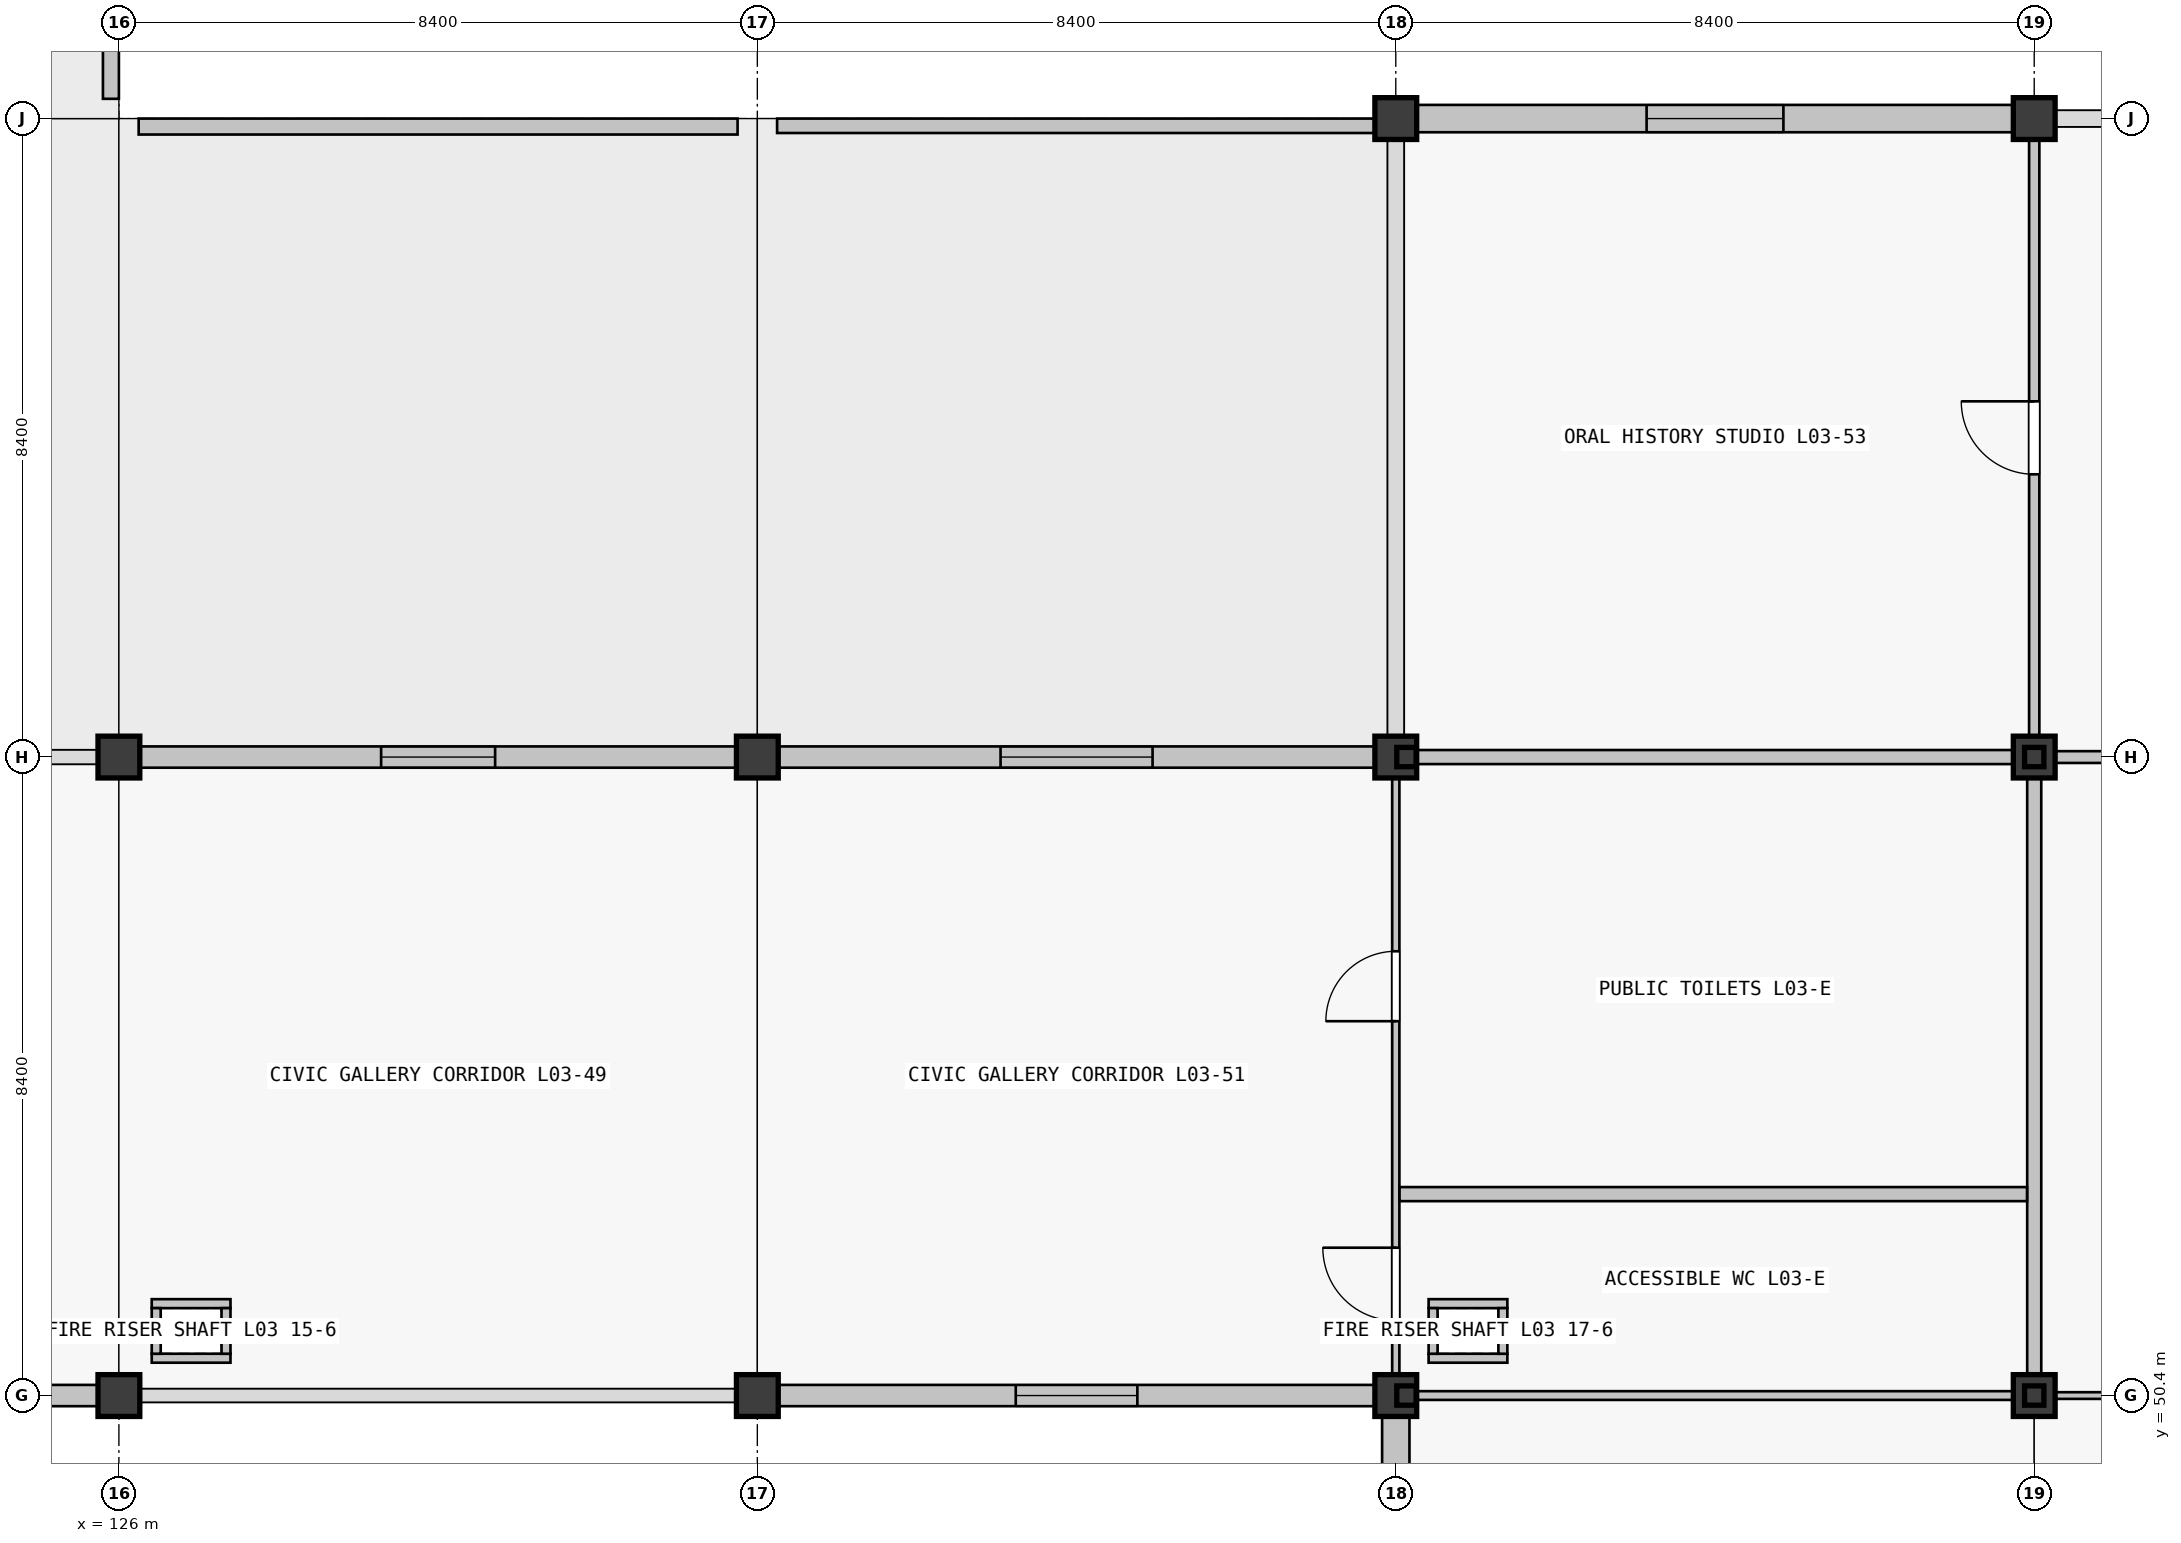
"""IFC4 building model, lengths in metres.
Left out: names, types, materials, properties, quantities, classifications, styles, units other than length and angle.
Written with IfcOpenShell. Run it as: python <this file> out.ifc"""

import sys

from ifc_helpers import new_model, si_unit, direction, frame, frame_2d, origin, origin_2d, place, context, subcontext, project, spatial, rectangle, i_section, extrude, element, fill, save


model = new_model("IFC4")
c1 = context("Model", 3, precision=1e-05, world=origin(), true_north=direction((0.0, 1.0)))
c2 = subcontext(c1, "Body", "Model", "MODEL_VIEW")
j1 = project(units=[si_unit("LENGTHUNIT", "METRE"), si_unit("PLANEANGLEUNIT", "RADIAN")], contexts=[c1])
p1 = place(None, origin())
s1 = spatial("IfcSite", under=j1, at=p1, CompositionType="ELEMENT")
p2 = place(p1, origin())
s2 = spatial("IfcBuilding", under=s1, at=p2, CompositionType="ELEMENT")
p3 = place(p2, frame((0.0, 0.0, 14.76)))
s3 = spatial("IfcBuildingStorey", under=s2, at=p3, CompositionType="ELEMENT", Elevation=14.76)
for number, where, z_axis, x_axis in (
    (1, (126.0, 50.4, 0.0), (0.0, 0.0, 1.0), (1.0, 0.0, 0.0)),
    (2, (126.0, 58.8, 0.0), (0.0, 0.0, 1.0), (1.0, 0.0, 0.0)),
    (3, (134.4, 50.4, 0.0), (0.0, 0.0, 1.0), (1.0, 0.0, 0.0)),
    (4, (134.4, 58.8, 0.0), (0.0, 0.0, 1.0), (1.0, 0.0, 0.0)),
):
    element("IfcColumn", number, at=place(p3, frame(where, z_axis=z_axis, x_axis=x_axis)), inside=s3, PredefinedType="COLUMN", context=c2, shape_type="SweptSolid", body=[
        extrude(rectangle(XDim=0.55, YDim=0.55, at=origin_2d()), origin(), (0.0, 0.0, 1.0), 4.07),
    ])
for number, where, z_axis, x_axis in (
    (5, (142.8, 50.4, 0.0), (0.0, 0.0, 1.0), (1.0, 0.0, 0.0)),
    (6, (142.8, 58.8, 0.0), (0.0, 0.0, 1.0), (1.0, 0.0, 0.0)),
    (7, (142.8, 67.2, 0.0), (0.0, 0.0, 1.0), (1.0, 0.0, 0.0)),
    (8, (151.2, 50.4, 0.0), (0.0, 0.0, 1.0), (1.0, 0.0, 0.0)),
    (9, (151.2, 58.8, 0.0), (0.0, 0.0, 1.0), (1.0, 0.0, 0.0)),
    (10, (151.2, 67.2, 0.0), (0.0, 0.0, 1.0), (1.0, 0.0, 0.0)),
):
    element("IfcColumn", number, at=place(p3, frame(where, z_axis=z_axis, x_axis=x_axis)), inside=s3, PredefinedType="COLUMN", context=c2, shape_type="SweptSolid", body=[
        extrude(rectangle(XDim=0.55, YDim=0.55, at=origin_2d()), origin(), (0.0, 0.0, 1.0), 4.17),
    ])
for number, where, z_axis, x_axis in (
    (11, (142.94, 50.4, 4.17), (0.0, 0.0, 1.0), (1.0, 0.0, 0.0)),
    (12, (151.2, 50.4, 4.17), (0.0, 0.0, 1.0), (1.0, 0.0, 0.0)),
    (13, (142.94, 58.8, 4.17), (0.0, 0.0, 1.0), (1.0, 0.0, 0.0)),
    (14, (151.2, 58.8, 4.17), (0.0, 0.0, 1.0), (1.0, 0.0, 0.0)),
):
    element("IfcColumn", number, at=place(p3, frame(where, z_axis=z_axis, x_axis=x_axis)), inside=s3, PredefinedType="COLUMN", context=c2, shape_type="SweptSolid", body=[
        extrude(i_section(OverallWidth=0.254, OverallDepth=0.254, WebThickness=0.009, FlangeThickness=0.014, FilletRadius=0.013, at=origin_2d()), origin(), (0.0, 0.0, 1.0), 2.157),
    ])
p4 = place(p3, frame((125.724, 50.4, 0.0), z_axis=(0.0, 0.0, 1.0), x_axis=(-1.0, 0.0, 0.0)))
e15 = element("IfcWall", 15, at=p4, inside=s3, PredefinedType="SOLIDWALL", context=c2, shape_type="SweptSolid", body=[
    extrude(rectangle(XDim=7.848, YDim=0.28, at=frame_2d((3.924, 0.0))), origin(), (0.0, 0.0, 1.0), 3.37),
])
p5 = place(p4, frame((3.024, 0.0, 0.9)))
e16 = element("IfcOpeningElement", 16, at=p5, cuts=e15, PredefinedType="OPENING", context=c2, shape_type="SweptSolid", body=[
    extrude(rectangle(XDim=1.8, YDim=1.8, at=frame_2d((0.9, 0.9))), frame((0.0, 0.14, 0.0), z_axis=(0.0, -1.0, 0.0), x_axis=(1.0, 0.0, 0.0)), (0.0, 0.0, 1.0), 0.28),
])
p6 = place(p3, frame((126.276, 58.8, 0.0), z_axis=(0.0, 0.0, 1.0), x_axis=(1.0, 0.0, 0.0)))
e17 = element("IfcWall", 17, at=p6, inside=s3, PredefinedType="SOLIDWALL", context=c2, shape_type="SweptSolid", body=[
    extrude(rectangle(XDim=7.848, YDim=0.28, at=frame_2d((3.924, 0.0))), origin(), (0.0, 0.0, 1.0), 3.37),
])
p7 = place(p6, frame((3.174, 0.0, 0.9)))
e18 = element("IfcOpeningElement", 18, at=p7, cuts=e17, PredefinedType="OPENING", context=c2, shape_type="SweptSolid", body=[
    extrude(rectangle(XDim=1.5, YDim=1.8, at=frame_2d((0.75, 0.9))), frame((0.0, 0.14, 0.0), z_axis=(0.0, -1.0, 0.0), x_axis=(1.0, 0.0, 0.0)), (0.0, 0.0, 1.0), 0.28),
])
p8 = place(p3, frame((142.524, 50.4, 0.0), z_axis=(0.0, 0.0, 1.0), x_axis=(-1.0, 0.0, 0.0)))
e19 = element("IfcWall", 19, at=p8, inside=s3, PredefinedType="SOLIDWALL", context=c2, shape_type="SweptSolid", body=[
    extrude(rectangle(XDim=7.848, YDim=0.28, at=frame_2d((3.924, 0.0))), origin(), (0.0, 0.0, 1.0), 3.37),
])
p9 = place(p8, frame((3.124, 0.0, 0.9)))
e20 = element("IfcOpeningElement", 20, at=p9, cuts=e19, PredefinedType="OPENING", context=c2, shape_type="SweptSolid", body=[
    extrude(rectangle(XDim=1.6, YDim=2.1, at=frame_2d((0.8, 1.05))), frame((0.0, 0.14, 0.0), z_axis=(0.0, -1.0, 0.0), x_axis=(1.0, 0.0, 0.0)), (0.0, 0.0, 1.0), 0.28),
])
p10 = place(p3, frame((134.676, 58.8, 0.0), z_axis=(0.0, 0.0, 1.0), x_axis=(1.0, 0.0, 0.0)))
e21 = element("IfcWall", 21, at=p10, inside=s3, PredefinedType="SOLIDWALL", context=c2, shape_type="SweptSolid", body=[
    extrude(rectangle(XDim=7.848, YDim=0.28, at=frame_2d((3.924, 0.0))), origin(), (0.0, 0.0, 1.0), 3.37),
])
p11 = place(p10, frame((2.924, 0.0, 0.9)))
e22 = element("IfcOpeningElement", 22, at=p11, cuts=e21, PredefinedType="OPENING", context=c2, shape_type="SweptSolid", body=[
    extrude(rectangle(XDim=2.0, YDim=2.1, at=frame_2d((1.0, 1.05))), frame((0.0, 0.14, 0.0), z_axis=(0.0, -1.0, 0.0), x_axis=(1.0, 0.0, 0.0)), (0.0, 0.0, 1.0), 0.28),
])
p12 = place(p3, frame((142.8, 42.276, 0.0), z_axis=(0.0, 0.0, 1.0), x_axis=(0.0, 1.0, 0.0)))
e23 = element("IfcWall", 23, at=p12, inside=s3, PredefinedType="SOLIDWALL", context=c2, shape_type="SweptSolid", body=[
    extrude(rectangle(XDim=7.848, YDim=0.36, at=frame_2d((3.924, 0.0))), origin(), (0.0, 0.0, 1.0), 3.37),
])
p13 = place(p12, frame((2.824, 0.0, 0.9)))
e24 = element("IfcOpeningElement", 24, at=p13, cuts=e23, PredefinedType="OPENING", context=c2, shape_type="SweptSolid", body=[
    extrude(rectangle(XDim=2.2, YDim=1.35, at=frame_2d((1.1, 0.675))), frame((0.0, 0.18, 0.0), z_axis=(0.0, -1.0, 0.0), x_axis=(1.0, 0.0, 0.0)), (0.0, 0.0, 1.0), 0.36),
])
p14 = place(p3, frame((143.076, 67.2, 0.0), z_axis=(0.0, 0.0, 1.0), x_axis=(1.0, 0.0, 0.0)))
e25 = element("IfcWall", 25, at=p14, inside=s3, PredefinedType="SOLIDWALL", context=c2, shape_type="SweptSolid", body=[
    extrude(rectangle(XDim=7.848, YDim=0.36, at=frame_2d((3.924, 0.0))), origin(), (0.0, 0.0, 1.0), 3.37),
])
p15 = place(p14, frame((3.024, 0.0, 0.9)))
e26 = element("IfcOpeningElement", 26, at=p15, cuts=e25, PredefinedType="OPENING", context=c2, shape_type="SweptSolid", body=[
    extrude(rectangle(XDim=1.8, YDim=1.35, at=frame_2d((0.9, 0.675))), frame((0.0, 0.18, 0.0), z_axis=(0.0, -1.0, 0.0), x_axis=(1.0, 0.0, 0.0)), (0.0, 0.0, 1.0), 0.36),
])
p16 = place(p3, frame((125.895, 75.34, 0.0), z_axis=(0.0, 0.0, 1.0), x_axis=(0.0, -1.0, 0.0)))
e27 = element("IfcWall", 27, at=p16, inside=s3, PredefinedType="PARAPET", context=c2, shape_type="SweptSolid", body=[
    extrude(rectangle(XDim=7.88, YDim=0.21, at=frame_2d((3.94, 0.0))), origin(), (0.0, 0.0, 1.0), 0.95),
])
p17 = place(p3, frame((126.26, 67.095, 0.0), z_axis=(0.0, 0.0, 1.0), x_axis=(1.0, 0.0, 0.0)))
e28 = element("IfcWall", 28, at=p17, inside=s3, PredefinedType="PARAPET", context=c2, shape_type="SweptSolid", body=[
    extrude(rectangle(XDim=7.88, YDim=0.21, at=frame_2d((3.94, 0.0))), origin(), (0.0, 0.0, 1.0), 0.95),
])
p18 = place(p3, frame((134.66, 67.105, 0.0), z_axis=(0.0, 0.0, 1.0), x_axis=(1.0, 0.0, 0.0)))
e29 = element("IfcWall", 29, at=p18, inside=s3, PredefinedType="PARAPET", context=c2, shape_type="SweptSolid", body=[
    extrude(rectangle(XDim=7.88, YDim=0.19, at=frame_2d((3.94, 0.0))), origin(), (0.0, 0.0, 1.0), 0.95),
])
for number, where, z_axis, x_axis in (
    (30, (126.432, 50.891, 0.0), (0.0, 0.0, 1.0), (1.0, 0.0, 0.0)),
    (31, (126.432, 51.609, 0.0), (0.0, 0.0, 1.0), (1.0, 0.0, 0.0)),
):
    element("IfcWall", number, at=place(p3, frame(where, z_axis=z_axis, x_axis=x_axis)), inside=s3, PredefinedType="PARTITIONING", context=c2, shape_type="SweptSolid", body=[
        extrude(rectangle(XDim=1.036, YDim=0.118, at=frame_2d((0.518, 0.0))), origin(), (0.0, 0.0, 1.0), 3.35),
    ])
for number, where, z_axis, x_axis in (
    (32, (126.491, 50.95, 0.0), (0.0, 0.0, 1.0), (0.0, 1.0, 0.0)),
    (33, (127.409, 50.95, 0.0), (0.0, 0.0, 1.0), (0.0, 1.0, 0.0)),
):
    element("IfcWall", number, at=place(p3, frame(where, z_axis=z_axis, x_axis=x_axis)), inside=s3, PredefinedType="PARTITIONING", context=c2, shape_type="SweptSolid", body=[
        extrude(rectangle(XDim=0.6, YDim=0.118, at=frame_2d((0.3, 0.0))), origin(), (0.0, 0.0, 1.0), 3.35),
    ])
for number, where, z_axis, x_axis in (
    (34, (143.232, 50.891, 0.0), (0.0, 0.0, 1.0), (1.0, 0.0, 0.0)),
    (35, (143.232, 51.609, 0.0), (0.0, 0.0, 1.0), (1.0, 0.0, 0.0)),
):
    element("IfcWall", number, at=place(p3, frame(where, z_axis=z_axis, x_axis=x_axis)), inside=s3, PredefinedType="PARTITIONING", context=c2, shape_type="SweptSolid", body=[
        extrude(rectangle(XDim=1.036, YDim=0.118, at=frame_2d((0.518, 0.0))), origin(), (0.0, 0.0, 1.0), 3.35),
    ])
for number, where, z_axis, x_axis in (
    (36, (143.291, 50.95, 0.0), (0.0, 0.0, 1.0), (0.0, 1.0, 0.0)),
    (37, (144.209, 50.95, 0.0), (0.0, 0.0, 1.0), (0.0, 1.0, 0.0)),
):
    element("IfcWall", number, at=place(p3, frame(where, z_axis=z_axis, x_axis=x_axis)), inside=s3, PredefinedType="PARTITIONING", context=c2, shape_type="SweptSolid", body=[
        extrude(rectangle(XDim=0.6, YDim=0.118, at=frame_2d((0.3, 0.0))), origin(), (0.0, 0.0, 1.0), 3.35),
    ])
p19 = place(p3, frame((143.077, 50.4, 0.0), z_axis=(0.0, 0.0, 1.0), x_axis=(1.0, 0.0, 0.0)))
e38 = element("IfcWall", 38, at=p19, inside=s3, PredefinedType="PARTITIONING", context=c2, shape_type="SweptSolid", body=[
    extrude(rectangle(XDim=7.846, YDim=0.115, at=frame_2d((3.923, 0.0))), origin(), (0.0, 0.0, 1.0), 3.19),
])
p20 = place(p3, frame((143.077, 58.8, 0.0), z_axis=(0.0, 0.0, 1.0), x_axis=(1.0, 0.0, 0.0)))
e39 = element("IfcWall", 39, at=p20, inside=s3, PredefinedType="PARTITIONING", context=c2, shape_type="SweptSolid", body=[
    extrude(rectangle(XDim=7.846, YDim=0.185, at=frame_2d((3.923, 0.0))), origin(), (0.0, 0.0, 1.0), 3.19),
])
p21 = place(p3, frame((151.477, 50.4, 0.0), z_axis=(0.0, 0.0, 1.0), x_axis=(1.0, 0.0, 0.0)))
e40 = element("IfcWall", 40, at=p21, inside=s3, PredefinedType="PARTITIONING", context=c2, shape_type="SweptSolid", body=[
    extrude(rectangle(XDim=7.846, YDim=0.088, at=frame_2d((3.923, 0.0))), origin(), (0.0, 0.0, 1.0), 3.19),
])
p22 = place(p21, frame((3.458, 0.0, 0.0)))
e41 = element("IfcOpeningElement", 41, at=p22, cuts=e40, PredefinedType="OPENING", context=c2, shape_type="SweptSolid", body=[
    extrude(rectangle(XDim=0.93, YDim=2.12, at=frame_2d((0.465, 1.06))), frame((0.0, 0.044, 0.0), z_axis=(0.0, -1.0, 0.0), x_axis=(1.0, 0.0, 0.0)), (0.0, 0.0, 1.0), 0.088),
])
p23 = place(p3, frame((151.477, 58.8, 0.0), z_axis=(0.0, 0.0, 1.0), x_axis=(1.0, 0.0, 0.0)))
e42 = element("IfcWall", 42, at=p23, inside=s3, PredefinedType="PARTITIONING", context=c2, shape_type="SweptSolid", body=[
    extrude(rectangle(XDim=7.846, YDim=0.155, at=frame_2d((3.923, 0.0))), origin(), (0.0, 0.0, 1.0), 3.19),
])
p24 = place(p23, frame((3.383, 0.0, 0.0)))
e43 = element("IfcOpeningElement", 43, at=p24, cuts=e42, PredefinedType="OPENING", context=c2, shape_type="SweptSolid", body=[
    extrude(rectangle(XDim=1.08, YDim=2.25, at=frame_2d((0.54, 1.125))), frame((0.0, 0.078, 0.0), z_axis=(0.0, -1.0, 0.0), x_axis=(1.0, 0.0, 0.0)), (0.0, 0.0, 1.0), 0.155),
])
p25 = place(p3, frame((142.8, 50.677, 0.0), z_axis=(0.0, 0.0, 1.0), x_axis=(0.0, 1.0, 0.0)))
e44 = element("IfcWall", 44, at=p25, inside=s3, PredefinedType="PARTITIONING", context=c2, shape_type="SweptSolid", body=[
    extrude(rectangle(XDim=7.846, YDim=0.095, at=frame_2d((3.923, 0.0))), origin(), (0.0, 0.0, 1.0), 3.19),
])
p26 = place(p25, frame((0.708, 0.0, 0.0)))
e45 = element("IfcOpeningElement", 45, at=p26, cuts=e44, PredefinedType="OPENING", context=c2, shape_type="SweptSolid", body=[
    extrude(rectangle(XDim=0.96, YDim=2.1, at=frame_2d((0.48, 1.05))), frame((0.0, 0.047, 0.0), z_axis=(0.0, -1.0, 0.0), x_axis=(1.0, 0.0, 0.0)), (0.0, 0.0, 1.0), 0.095),
])
p27 = place(p25, frame((4.648, 0.0, 0.0)))
e46 = element("IfcOpeningElement", 46, at=p27, cuts=e44, PredefinedType="OPENING", context=c2, shape_type="SweptSolid", body=[
    extrude(rectangle(XDim=0.92, YDim=2.1, at=frame_2d((0.46, 1.05))), frame((0.0, 0.047, 0.0), z_axis=(0.0, -1.0, 0.0), x_axis=(1.0, 0.0, 0.0)), (0.0, 0.0, 1.0), 0.095),
])
p28 = place(p3, frame((151.2, 50.677, 0.0), z_axis=(0.0, 0.0, 1.0), x_axis=(0.0, 1.0, 0.0)))
e47 = element("IfcWall", 47, at=p28, inside=s3, PredefinedType="PARTITIONING", context=c2, shape_type="SweptSolid", body=[
    extrude(rectangle(XDim=7.846, YDim=0.185, at=frame_2d((3.923, 0.0))), origin(), (0.0, 0.0, 1.0), 3.19),
])
p29 = place(p3, frame((151.2, 59.077, 0.0), z_axis=(0.0, 0.0, 1.0), x_axis=(0.0, 1.0, 0.0)))
e48 = element("IfcWall", 48, at=p29, inside=s3, PredefinedType="PARTITIONING", context=c2, shape_type="SweptSolid", body=[
    extrude(rectangle(XDim=7.846, YDim=0.135, at=frame_2d((3.923, 0.0))), origin(), (0.0, 0.0, 1.0), 3.19),
])
p30 = place(p29, frame((3.443, 0.0, 0.0)))
e49 = element("IfcOpeningElement", 49, at=p30, cuts=e48, PredefinedType="OPENING", context=c2, shape_type="SweptSolid", body=[
    extrude(rectangle(XDim=0.96, YDim=2.18, at=frame_2d((0.48, 1.09))), frame((0.0, 0.067, 0.0), z_axis=(0.0, -1.0, 0.0), x_axis=(1.0, 0.0, 0.0)), (0.0, 0.0, 1.0), 0.135),
])
p31 = place(p3, frame((142.85, 53.05, 0.0), z_axis=(0.0, 0.0, 1.0), x_axis=(1.0, 0.0, 0.0)))
e50 = element("IfcWall", 50, at=p31, inside=s3, PredefinedType="PARTITIONING", context=c2, shape_type="SweptSolid", body=[
    extrude(rectangle(XDim=8.256, YDim=0.185, at=frame_2d((4.128, 0.0))), origin(), (0.0, 0.0, 1.0), 3.19),
])
p32 = place(p7, origin())
e51 = element("IfcWindow", 51, at=p32, inside=s3, PartitioningType="SINGLE_PANEL", PredefinedType="WINDOW", context=c2, shape_type="SweptSolid", body=[
    extrude(rectangle(XDim=1.5, YDim=1.8, at=frame_2d((0.75, 0.9))), frame((0.0, 0.03, 0.0), z_axis=(0.0, -1.0, 0.0), x_axis=(1.0, 0.0, 0.0)), (0.0, 0.0, 1.0), 0.06),
])
fill(e18, e51)
p33 = place(p9, origin())
e52 = element("IfcWindow", 52, at=p33, inside=s3, PartitioningType="SINGLE_PANEL", PredefinedType="WINDOW", context=c2, shape_type="SweptSolid", body=[
    extrude(rectangle(XDim=1.6, YDim=2.1, at=frame_2d((0.8, 1.05))), frame((0.0, 0.03, 0.0), z_axis=(0.0, -1.0, 0.0), x_axis=(1.0, 0.0, 0.0)), (0.0, 0.0, 1.0), 0.06),
])
fill(e20, e52)
p34 = place(p11, origin())
e53 = element("IfcWindow", 53, at=p34, inside=s3, PartitioningType="SINGLE_PANEL", PredefinedType="WINDOW", context=c2, shape_type="SweptSolid", body=[
    extrude(rectangle(XDim=2.0, YDim=2.1, at=frame_2d((1.0, 1.05))), frame((0.0, 0.03, 0.0), z_axis=(0.0, -1.0, 0.0), x_axis=(1.0, 0.0, 0.0)), (0.0, 0.0, 1.0), 0.06),
])
fill(e22, e53)
p35 = place(p15, origin())
e54 = element("IfcWindow", 54, at=p35, inside=s3, PartitioningType="SINGLE_PANEL", PredefinedType="WINDOW", context=c2, shape_type="SweptSolid", body=[
    extrude(rectangle(XDim=1.8, YDim=1.35, at=frame_2d((0.9, 0.675))), frame((0.0, 0.03, 0.0), z_axis=(0.0, -1.0, 0.0), x_axis=(1.0, 0.0, 0.0)), (0.0, 0.0, 1.0), 0.06),
])
fill(e26, e54)
p36 = place(p3, frame((0.0, 0.0, -0.26)))
p37 = place(p36, frame((138.6, 63.0, 0.0)))
p38 = place(p37, frame((0.0, 0.0, 0.21)))
e55 = element("IfcWindow", 55, at=p38, inside=s3, PartitioningType="SINGLE_PANEL", PredefinedType="SKYLIGHT", context=c2, shape_type="SweptSolid", body=[
    extrude(rectangle(XDim=1.8, YDim=1.2, at=origin_2d()), origin(), (0.0, 0.0, 1.0), 0.05),
])
p39 = place(p26, origin())
e56 = element("IfcDoor", 56, at=p39, inside=s3, OperationType="SINGLE_SWING_RIGHT", PredefinedType="DOOR", context=c2, shape_type="SweptSolid", body=[
    extrude(rectangle(XDim=0.96, YDim=2.1, at=frame_2d((0.48, 1.05))), frame((0.0, 0.025, 0.0), z_axis=(0.0, -1.0, 0.0), x_axis=(1.0, 0.0, 0.0)), (0.0, 0.0, 1.0), 0.05),
])
fill(e45, e56)
p40 = place(p27, origin())
e57 = element("IfcDoor", 57, at=p40, inside=s3, OperationType="SINGLE_SWING_LEFT", PredefinedType="DOOR", context=c2, shape_type="SweptSolid", body=[
    extrude(rectangle(XDim=0.92, YDim=2.1, at=frame_2d((0.46, 1.05))), frame((0.0, 0.025, 0.0), z_axis=(0.0, -1.0, 0.0), x_axis=(1.0, 0.0, 0.0)), (0.0, 0.0, 1.0), 0.05),
])
fill(e46, e57)
p41 = place(p30, origin())
e58 = element("IfcDoor", 58, at=p41, inside=s3, OperationType="SINGLE_SWING_RIGHT", PredefinedType="DOOR", context=c2, shape_type="SweptSolid", body=[
    extrude(rectangle(XDim=0.96, YDim=2.18, at=frame_2d((0.48, 1.09))), frame((0.0, 0.025, 0.0), z_axis=(0.0, -1.0, 0.0), x_axis=(1.0, 0.0, 0.0)), (0.0, 0.0, 1.0), 0.05),
])
fill(e49, e58)
save(model, sys.argv[1])
